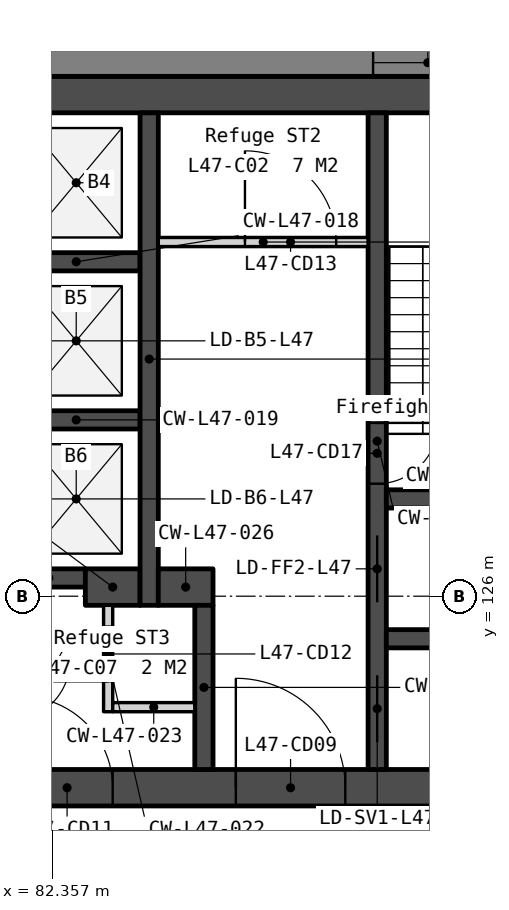
"""IFC4 building model, lengths in metres.
Left out: names, types, materials, properties, quantities, classifications, styles, units other than length and angle.
Written with IfcOpenShell. Run it as: python <this file> out.ifc"""

import sys

from ifc_helpers import new_model, si_unit, direction, frame, frame_2d, origin, place, context, subcontext, project, spatial, polyline, rectangle, outline, extrude, element, fill, save


model = new_model("IFC4")
c1 = context("Model", 3, precision=1e-05, world=origin(), true_north=direction((0.0, 1.0)))
c2 = subcontext(c1, "Body", "Model", "MODEL_VIEW")
j1 = project(units=[si_unit("LENGTHUNIT", "METRE"), si_unit("PLANEANGLEUNIT", "RADIAN")], contexts=[c1])
p1 = place(None, origin())
s1 = spatial("IfcSite", under=j1, at=p1, CompositionType="ELEMENT")
p2 = place(p1, origin())
s2 = spatial("IfcBuilding", under=s1, at=p2, CompositionType="ELEMENT")
p3 = place(p2, frame((0.0, 0.0, 188.0)))
s3 = spatial("IfcBuildingStorey", under=s2, at=p3, CompositionType="ELEMENT", Elevation=188.0)
p4 = place(p3, frame((69.0, 134.25, 0.0), z_axis=(0.0, 0.0, 1.0), x_axis=(1.0, 0.0, 0.0)))
e1 = element("IfcWall", 1, at=p4, inside=s3, PredefinedType="SOLIDWALL", context=c2, shape_type="SweptSolid", body=[
    extrude(rectangle(XDim=22.0, YDim=0.6, at=frame_2d((11.0, 0.0))), origin(), (0.0, 0.0, 1.0), 3.75),
])
p5 = place(p3, frame((69.0, 122.85, 0.0), z_axis=(0.0, 0.0, 1.0), x_axis=(1.0, 0.0, 0.0)))
e2 = element("IfcWall", 2, at=p5, inside=s3, PredefinedType="SOLIDWALL", context=c2, shape_type="SweptSolid", body=[
    extrude(rectangle(XDim=22.0, YDim=0.6, at=frame_2d((11.0, 0.0))), origin(), (0.0, 0.0, 1.0), 3.75),
])
p6 = place(p5, frame((16.375, 0.0, 0.0)))
e3 = element("IfcOpeningElement", 3, at=p6, cuts=e2, PredefinedType="OPENING", context=c2, shape_type="SweptSolid", body=[
    extrude(rectangle(XDim=1.8, YDim=2.1, at=frame_2d((0.9, 1.05))), frame((0.0, 0.31, 0.0), z_axis=(0.0, -1.0, 0.0), x_axis=(1.0, 0.0, 0.0)), (0.0, 0.0, 1.0), 0.62),
])
p7 = place(p5, frame((3.825, 0.0, 0.0)))
e4 = element("IfcOpeningElement", 4, at=p7, cuts=e2, PredefinedType="OPENING", context=c2, shape_type="SweptSolid", body=[
    extrude(rectangle(XDim=1.8, YDim=2.1, at=frame_2d((0.9, 1.05))), frame((0.0, 0.31, 0.0), z_axis=(0.0, -1.0, 0.0), x_axis=(1.0, 0.0, 0.0)), (0.0, 0.0, 1.0), 0.62),
])
p8 = place(p5, frame((12.85, 0.0, 0.0)))
e5 = element("IfcOpeningElement", 5, at=p8, cuts=e2, PredefinedType="OPENING", context=c2, shape_type="SweptSolid", body=[
    extrude(rectangle(XDim=1.5, YDim=2.1, at=frame_2d((0.75, 1.05))), frame((0.0, 0.31, 0.0), z_axis=(0.0, -1.0, 0.0), x_axis=(1.0, 0.0, 0.0)), (0.0, 0.0, 1.0), 0.62),
])
for number, where, z_axis, x_axis in (
    (6, (81.7, 131.5, 0.0), (0.0, 0.0, 1.0), (1.0, 0.0, 0.0)),
    (7, (81.7, 128.9, 0.0), (0.0, 0.0, 1.0), (1.0, 0.0, 0.0)),
):
    element("IfcWall", number, at=place(p3, frame(where, z_axis=z_axis, x_axis=x_axis)), inside=s3, PredefinedType="SOLIDWALL", context=c2, shape_type="SweptSolid", body=[
        extrude(rectangle(XDim=2.1, YDim=0.3, at=frame_2d((1.05, 0.0))), origin(), (0.0, 0.0, 1.0), 3.75),
    ])
p9 = place(p3, frame((81.7, 126.3, 0.0), z_axis=(0.0, 0.0, 1.0), x_axis=(1.0, 0.0, 0.0)))
e8 = element("IfcWall", 8, at=p9, inside=s3, PredefinedType="SOLIDWALL", context=c2, shape_type="SweptSolid", body=[
    extrude(rectangle(XDim=1.2, YDim=0.3, at=frame_2d((0.6, 0.0))), origin(), (0.0, 0.0, 1.0), 3.75),
])
p10 = place(p3, frame((82.9, 126.15, 0.0), z_axis=(0.0, 0.0, 1.0), x_axis=(1.0, 0.0, 0.0)))
e9 = element("IfcWall", 9, at=p10, inside=s3, PredefinedType="SOLIDWALL", context=c2, shape_type="SweptSolid", body=[
    extrude(rectangle(XDim=0.9, YDim=0.6, at=frame_2d((0.45, 0.0))), origin(), (0.0, 0.0, 1.0), 3.75),
])
p11 = place(p3, frame((83.275, 125.85, 0.0), z_axis=(0.0, 0.0, 1.0), x_axis=(0.0, -1.0, 0.0)))
e10 = element("IfcWall", 10, at=p11, inside=s3, PredefinedType="PARTITIONING", context=c2, shape_type="SweptSolid", body=[
    extrude(rectangle(XDim=1.75, YDim=0.15, at=frame_2d((0.875, 0.0))), origin(), (0.0, 0.0, 1.0), 3.75),
])
p12 = place(p11, frame((0.35, 0.0, 0.0)))
e11 = element("IfcOpeningElement", 11, at=p12, cuts=e10, PredefinedType="OPENING", context=c2, shape_type="SweptSolid", body=[
    extrude(rectangle(XDim=0.9, YDim=2.1, at=frame_2d((0.45, 1.05))), frame((0.0, 0.085, 0.0), z_axis=(0.0, -1.0, 0.0), x_axis=(1.0, 0.0, 0.0)), (0.0, 0.0, 1.0), 0.17),
])
p13 = place(p3, frame((83.35, 124.175, 0.0), z_axis=(0.0, 0.0, 1.0), x_axis=(1.0, 0.0, 0.0)))
e12 = element("IfcWall", 12, at=p13, inside=s3, PredefinedType="PARTITIONING", context=c2, shape_type="SweptSolid", body=[
    extrude(rectangle(XDim=1.35, YDim=0.15, at=frame_2d((0.675, 0.0))), origin(), (0.0, 0.0, 1.0), 3.75),
])
p14 = place(p3, frame((83.95, 133.95, 0.0), z_axis=(0.0, 0.0, 1.0), x_axis=(0.0, -1.0, 0.0)))
e13 = element("IfcWall", 13, at=p14, inside=s3, PredefinedType="SOLIDWALL", context=c2, shape_type="SweptSolid", body=[
    extrude(rectangle(XDim=8.1, YDim=0.3, at=frame_2d((4.05, 0.0))), origin(), (0.0, 0.0, 1.0), 3.75),
])
p15 = place(p3, frame((84.1, 131.825, 0.0), z_axis=(0.0, 0.0, 1.0), x_axis=(1.0, 0.0, 0.0)))
e14 = element("IfcWall", 14, at=p15, inside=s3, PredefinedType="PARTITIONING", context=c2, shape_type="SweptSolid", body=[
    extrude(rectangle(XDim=3.45, YDim=0.15, at=frame_2d((1.725, 0.0))), origin(), (0.0, 0.0, 1.0), 3.75),
])
p16 = place(p15, frame((1.425, 0.0, 0.0)))
e15 = element("IfcOpeningElement", 15, at=p16, cuts=e14, PredefinedType="OPENING", context=c2, shape_type="SweptSolid", body=[
    extrude(rectangle(XDim=1.5, YDim=2.1, at=frame_2d((0.75, 1.05))), frame((0.0, 0.085, 0.0), z_axis=(0.0, -1.0, 0.0), x_axis=(1.0, 0.0, 0.0)), (0.0, 0.0, 1.0), 0.17),
])
p17 = place(p3, frame((84.1, 126.15, 0.0), z_axis=(0.0, 0.0, 1.0), x_axis=(1.0, 0.0, 0.0)))
e16 = element("IfcWall", 16, at=p17, inside=s3, PredefinedType="SOLIDWALL", context=c2, shape_type="SweptSolid", body=[
    extrude(rectangle(XDim=0.9, YDim=0.6, at=frame_2d((0.45, 0.0))), origin(), (0.0, 0.0, 1.0), 3.75),
])
p18 = place(p3, frame((84.85, 125.85, 0.0), z_axis=(0.0, 0.0, 1.0), x_axis=(0.0, -1.0, 0.0)))
e17 = element("IfcWall", 17, at=p18, inside=s3, PredefinedType="SOLIDWALL", context=c2, shape_type="SweptSolid", body=[
    extrude(rectangle(XDim=2.7, YDim=0.3, at=frame_2d((1.35, 0.0))), origin(), (0.0, 0.0, 1.0), 3.75),
])
p19 = place(p3, frame((87.7, 133.95, 0.0), z_axis=(0.0, 0.0, 1.0), x_axis=(0.0, -1.0, 0.0)))
e18 = element("IfcWall", 18, at=p19, inside=s3, PredefinedType="SOLIDWALL", context=c2, shape_type="SweptSolid", body=[
    extrude(rectangle(XDim=10.8, YDim=0.3, at=frame_2d((5.4, 0.0))), origin(), (0.0, 0.0, 1.0), 3.75),
])
p20 = place(p19, frame((6.95, 0.0, 0.0)))
e19 = element("IfcOpeningElement", 19, at=p20, cuts=e18, PredefinedType="OPENING", context=c2, shape_type="SweptSolid", body=[
    extrude(rectangle(XDim=1.1, YDim=2.1, at=frame_2d((0.55, 1.05))), frame((0.0, 0.16, 0.0), z_axis=(0.0, -1.0, 0.0), x_axis=(1.0, 0.0, 0.0)), (0.0, 0.0, 1.0), 0.32),
])
p21 = place(p19, frame((5.1, 0.0, 0.0)))
e20 = element("IfcOpeningElement", 20, at=p21, cuts=e18, PredefinedType="OPENING", context=c2, shape_type="SweptSolid", body=[
    extrude(rectangle(XDim=1.0, YDim=2.1, at=frame_2d((0.5, 1.05))), frame((0.0, 0.16, 0.0), z_axis=(0.0, -1.0, 0.0), x_axis=(1.0, 0.0, 0.0)), (0.0, 0.0, 1.0), 0.32),
])
p22 = place(p19, frame((9.25, 0.0, 0.0)))
e21 = element("IfcOpeningElement", 21, at=p22, cuts=e18, PredefinedType="OPENING", context=c2, shape_type="SweptSolid", body=[
    extrude(rectangle(XDim=1.1, YDim=2.1, at=frame_2d((0.55, 1.05))), frame((0.0, 0.16, 0.0), z_axis=(0.0, -1.0, 0.0), x_axis=(1.0, 0.0, 0.0)), (0.0, 0.0, 1.0), 0.32),
])
for number, where, z_axis, x_axis in (
    (22, (87.85, 127.6, 0.0), (0.0, 0.0, 1.0), (1.0, 0.0, 0.0)),
    (23, (87.85, 125.3, 0.0), (0.0, 0.0, 1.0), (1.0, 0.0, 0.0)),
):
    element("IfcWall", number, at=place(p3, frame(where, z_axis=z_axis, x_axis=x_axis)), inside=s3, PredefinedType="SOLIDWALL", context=c2, shape_type="SweptSolid", body=[
        extrude(rectangle(XDim=2.55, YDim=0.3, at=frame_2d((1.275, 0.0))), origin(), (0.0, 0.0, 1.0), 3.75),
    ])
p23 = place(p3, frame((99.365, 134.775, -0.15), z_axis=(0.0, 0.0, 1.0), x_axis=(-1.0, 0.0, 0.0)))
e24 = element("IfcWall", 24, at=p23, inside=s3, PredefinedType="SOLIDWALL", context=c2, shape_type="SweptSolid", body=[
    extrude(outline(polyline([(38.729, 0.0), (38.729, 3.9), (0.0, 3.9), (0.0, 0.0), (38.729, 0.0)])), frame((0.0, 0.225, 0.0), z_axis=(0.0, -1.0, 0.0), x_axis=(1.0, 0.0, 0.0)), (0.0, 0.0, 1.0), 0.45),
])
p24 = place(p23, frame((0.807, 0.0, 0.95)))
e25 = element("IfcOpeningElement", 25, at=p24, cuts=e24, PredefinedType="OPENING", context=c2, shape_type="SweptSolid", body=[
    extrude(rectangle(XDim=1.2, YDim=2.2, at=frame_2d((0.6, 1.1))), frame((0.0, 0.235, 0.0), z_axis=(0.0, -1.0, 0.0), x_axis=(1.0, 0.0, 0.0)), (0.0, 0.0, 1.0), 0.47),
])
p25 = place(p23, frame((7.632, 0.0, 0.95)))
e26 = element("IfcOpeningElement", 26, at=p25, cuts=e24, PredefinedType="OPENING", context=c2, shape_type="SweptSolid", body=[
    extrude(rectangle(XDim=1.8, YDim=2.2, at=frame_2d((0.9, 1.1))), frame((0.0, 0.235, 0.0), z_axis=(0.0, -1.0, 0.0), x_axis=(1.0, 0.0, 0.0)), (0.0, 0.0, 1.0), 0.47),
])
p26 = place(p23, frame((9.932, 0.0, 0.95)))
e27 = element("IfcOpeningElement", 27, at=p26, cuts=e24, PredefinedType="OPENING", context=c2, shape_type="SweptSolid", body=[
    extrude(rectangle(XDim=1.8, YDim=2.2, at=frame_2d((0.9, 1.1))), frame((0.0, 0.235, 0.0), z_axis=(0.0, -1.0, 0.0), x_axis=(1.0, 0.0, 0.0)), (0.0, 0.0, 1.0), 0.47),
])
p27 = place(p23, frame((17.315, 0.0, 0.95)))
e28 = element("IfcOpeningElement", 28, at=p27, cuts=e24, PredefinedType="OPENING", context=c2, shape_type="SweptSolid", body=[
    extrude(rectangle(XDim=1.8, YDim=2.2, at=frame_2d((0.9, 1.1))), frame((0.0, 0.235, 0.0), z_axis=(0.0, -1.0, 0.0), x_axis=(1.0, 0.0, 0.0)), (0.0, 0.0, 1.0), 0.47),
])
p28 = place(p23, frame((19.615, 0.0, 0.95)))
e29 = element("IfcOpeningElement", 29, at=p28, cuts=e24, PredefinedType="OPENING", context=c2, shape_type="SweptSolid", body=[
    extrude(rectangle(XDim=1.8, YDim=2.2, at=frame_2d((0.9, 1.1))), frame((0.0, 0.235, 0.0), z_axis=(0.0, -1.0, 0.0), x_axis=(1.0, 0.0, 0.0)), (0.0, 0.0, 1.0), 0.47),
])
p29 = place(p23, frame((26.997, 0.0, 0.95)))
e30 = element("IfcOpeningElement", 30, at=p29, cuts=e24, PredefinedType="OPENING", context=c2, shape_type="SweptSolid", body=[
    extrude(rectangle(XDim=1.8, YDim=2.2, at=frame_2d((0.9, 1.1))), frame((0.0, 0.235, 0.0), z_axis=(0.0, -1.0, 0.0), x_axis=(1.0, 0.0, 0.0)), (0.0, 0.0, 1.0), 0.47),
])
p30 = place(p23, frame((29.297, 0.0, 0.95)))
e31 = element("IfcOpeningElement", 31, at=p30, cuts=e24, PredefinedType="OPENING", context=c2, shape_type="SweptSolid", body=[
    extrude(rectangle(XDim=1.8, YDim=2.2, at=frame_2d((0.9, 1.1))), frame((0.0, 0.235, 0.0), z_axis=(0.0, -1.0, 0.0), x_axis=(1.0, 0.0, 0.0)), (0.0, 0.0, 1.0), 0.47),
])
p31 = place(p23, frame((36.722, 0.0, 0.95)))
e32 = element("IfcOpeningElement", 32, at=p31, cuts=e24, PredefinedType="OPENING", context=c2, shape_type="SweptSolid", body=[
    extrude(rectangle(XDim=1.2, YDim=2.2, at=frame_2d((0.6, 1.1))), frame((0.0, 0.235, 0.0), z_axis=(0.0, -1.0, 0.0), x_axis=(1.0, 0.0, 0.0)), (0.0, 0.0, 1.0), 0.47),
])
p32 = place(p3, frame((81.505, 98.627, -0.15), z_axis=(0.0, 0.0, 1.0), x_axis=(0.500002199942, 0.866024133644, 0.0)))
e33 = element("IfcWall", 33, at=p32, inside=s3, PredefinedType="SOLIDWALL", context=c2, shape_type="SweptSolid", body=[
    extrude(outline(polyline([(38.729, 0.0), (38.729, 3.9), (0.0, 3.9), (0.0, 0.0), (38.729, 0.0)])), frame((0.0, 0.225, 0.0), z_axis=(0.0, -1.0, 0.0), x_axis=(1.0, 0.0, 0.0)), (0.0, 0.0, 1.0), 0.45),
])
p33 = place(p32, frame((0.807, 0.0, 0.95)))
e34 = element("IfcOpeningElement", 34, at=p33, cuts=e33, PredefinedType="OPENING", context=c2, shape_type="SweptSolid", body=[
    extrude(rectangle(XDim=1.2, YDim=2.2, at=frame_2d((0.6, 1.1))), frame((0.0, 0.235, 0.0), z_axis=(0.0, -1.0, 0.0), x_axis=(1.0, 0.0, 0.0)), (0.0, 0.0, 1.0), 0.47),
])
p34 = place(p32, frame((7.632, 0.0, 0.95)))
e35 = element("IfcOpeningElement", 35, at=p34, cuts=e33, PredefinedType="OPENING", context=c2, shape_type="SweptSolid", body=[
    extrude(rectangle(XDim=1.8, YDim=2.2, at=frame_2d((0.9, 1.1))), frame((0.0, 0.235, 0.0), z_axis=(0.0, -1.0, 0.0), x_axis=(1.0, 0.0, 0.0)), (0.0, 0.0, 1.0), 0.47),
])
p35 = place(p32, frame((9.932, 0.0, 0.95)))
e36 = element("IfcOpeningElement", 36, at=p35, cuts=e33, PredefinedType="OPENING", context=c2, shape_type="SweptSolid", body=[
    extrude(rectangle(XDim=1.8, YDim=2.2, at=frame_2d((0.9, 1.1))), frame((0.0, 0.235, 0.0), z_axis=(0.0, -1.0, 0.0), x_axis=(1.0, 0.0, 0.0)), (0.0, 0.0, 1.0), 0.47),
])
p36 = place(p32, frame((17.315, 0.0, 0.95)))
e37 = element("IfcOpeningElement", 37, at=p36, cuts=e33, PredefinedType="OPENING", context=c2, shape_type="SweptSolid", body=[
    extrude(rectangle(XDim=1.8, YDim=2.2, at=frame_2d((0.9, 1.1))), frame((0.0, 0.235, 0.0), z_axis=(0.0, -1.0, 0.0), x_axis=(1.0, 0.0, 0.0)), (0.0, 0.0, 1.0), 0.47),
])
p37 = place(p32, frame((19.615, 0.0, 0.95)))
e38 = element("IfcOpeningElement", 38, at=p37, cuts=e33, PredefinedType="OPENING", context=c2, shape_type="SweptSolid", body=[
    extrude(rectangle(XDim=1.8, YDim=2.2, at=frame_2d((0.9, 1.1))), frame((0.0, 0.235, 0.0), z_axis=(0.0, -1.0, 0.0), x_axis=(1.0, 0.0, 0.0)), (0.0, 0.0, 1.0), 0.47),
])
p38 = place(p32, frame((26.997, 0.0, 0.95)))
e39 = element("IfcOpeningElement", 39, at=p38, cuts=e33, PredefinedType="OPENING", context=c2, shape_type="SweptSolid", body=[
    extrude(rectangle(XDim=1.8, YDim=2.2, at=frame_2d((0.9, 1.1))), frame((0.0, 0.235, 0.0), z_axis=(0.0, -1.0, 0.0), x_axis=(1.0, 0.0, 0.0)), (0.0, 0.0, 1.0), 0.47),
])
p39 = place(p32, frame((29.297, 0.0, 0.95)))
e40 = element("IfcOpeningElement", 40, at=p39, cuts=e33, PredefinedType="OPENING", context=c2, shape_type="SweptSolid", body=[
    extrude(rectangle(XDim=1.8, YDim=2.2, at=frame_2d((0.9, 1.1))), frame((0.0, 0.235, 0.0), z_axis=(0.0, -1.0, 0.0), x_axis=(1.0, 0.0, 0.0)), (0.0, 0.0, 1.0), 0.47),
])
p40 = place(p32, frame((36.722, 0.0, 0.95)))
e41 = element("IfcOpeningElement", 41, at=p40, cuts=e33, PredefinedType="OPENING", context=c2, shape_type="SweptSolid", body=[
    extrude(rectangle(XDim=1.2, YDim=2.2, at=frame_2d((0.6, 1.1))), frame((0.0, 0.235, 0.0), z_axis=(0.0, -1.0, 0.0), x_axis=(1.0, 0.0, 0.0)), (0.0, 0.0, 1.0), 0.47),
])
p41 = place(p20, origin())
e42 = element("IfcDoor", 42, at=p41, inside=s3, OperationType="SLIDING_TO_LEFT", PredefinedType="DOOR", context=c2, shape_type="SweptSolid", body=[
    extrude(rectangle(XDim=1.1, YDim=2.1, at=frame_2d((0.55, 1.05))), frame((0.0, 0.025, 0.0), z_axis=(0.0, -1.0, 0.0), x_axis=(1.0, 0.0, 0.0)), (0.0, 0.0, 1.0), 0.05),
])
fill(e19, e42)
p42 = place(p6, origin())
e43 = element("IfcDoor", 43, at=p42, inside=s3, OperationType="DOUBLE_DOOR_DOUBLE_SWING", PredefinedType="DOOR", context=c2, shape_type="SweptSolid", body=[
    extrude(rectangle(XDim=1.8, YDim=2.1, at=frame_2d((0.9, 1.05))), frame((0.0, 0.025, 0.0), z_axis=(0.0, -1.0, 0.0), x_axis=(1.0, 0.0, 0.0)), (0.0, 0.0, 1.0), 0.05),
])
fill(e3, e43)
p43 = place(p8, origin())
e44 = element("IfcDoor", 44, at=p43, inside=s3, OperationType="DOUBLE_DOOR_DOUBLE_SWING", PredefinedType="DOOR", context=c2, shape_type="SweptSolid", body=[
    extrude(rectangle(XDim=1.5, YDim=2.1, at=frame_2d((0.75, 1.05))), frame((0.0, 0.025, 0.0), z_axis=(0.0, -1.0, 0.0), x_axis=(1.0, 0.0, 0.0)), (0.0, 0.0, 1.0), 0.05),
])
fill(e5, e44)
p44 = place(p12, origin())
e45 = element("IfcDoor", 45, at=p44, inside=s3, OperationType="SINGLE_SWING_RIGHT", PredefinedType="DOOR", context=c2, shape_type="SweptSolid", body=[
    extrude(rectangle(XDim=0.9, YDim=2.1, at=frame_2d((0.45, 1.05))), frame((0.0, 0.025, 0.0), z_axis=(0.0, -1.0, 0.0), x_axis=(1.0, 0.0, 0.0)), (0.0, 0.0, 1.0), 0.05),
])
fill(e11, e45)
p45 = place(p16, origin())
e46 = element("IfcDoor", 46, at=p45, inside=s3, OperationType="DOUBLE_DOOR_DOUBLE_SWING", PredefinedType="DOOR", context=c2, shape_type="SweptSolid", body=[
    extrude(rectangle(XDim=1.5, YDim=2.1, at=frame_2d((0.75, 1.05))), frame((0.0, 0.025, 0.0), z_axis=(0.0, -1.0, 0.0), x_axis=(1.0, 0.0, 0.0)), (0.0, 0.0, 1.0), 0.05),
])
fill(e15, e46)
p46 = place(p21, origin())
e47 = element("IfcDoor", 47, at=p46, inside=s3, OperationType="SINGLE_SWING_LEFT", PredefinedType="DOOR", context=c2, shape_type="SweptSolid", body=[
    extrude(rectangle(XDim=1.0, YDim=2.1, at=frame_2d((0.5, 1.05))), frame((0.0, 0.025, 0.0), z_axis=(0.0, -1.0, 0.0), x_axis=(1.0, 0.0, 0.0)), (0.0, 0.0, 1.0), 0.05),
])
fill(e20, e47)
p47 = place(p22, origin())
e48 = element("IfcDoor", 48, at=p47, inside=s3, OperationType="SLIDING_TO_LEFT", PredefinedType="DOOR", context=c2, shape_type="SweptSolid", body=[
    extrude(rectangle(XDim=1.1, YDim=2.1, at=frame_2d((0.55, 1.05))), frame((0.0, 0.025, 0.0), z_axis=(0.0, -1.0, 0.0), x_axis=(1.0, 0.0, 0.0)), (0.0, 0.0, 1.0), 0.05),
])
fill(e21, e48)
p48 = place(p26, origin())
e49 = element("IfcWindow", 49, at=p48, inside=s3, PartitioningType="SINGLE_PANEL", PredefinedType="WINDOW", context=c2, shape_type="SweptSolid", body=[
    extrude(rectangle(XDim=1.8, YDim=2.2, at=frame_2d((0.9, 1.1))), frame((0.0, 0.03, 0.0), z_axis=(0.0, -1.0, 0.0), x_axis=(1.0, 0.0, 0.0)), (0.0, 0.0, 1.0), 0.06),
])
fill(e27, e49)
save(model, sys.argv[1])
